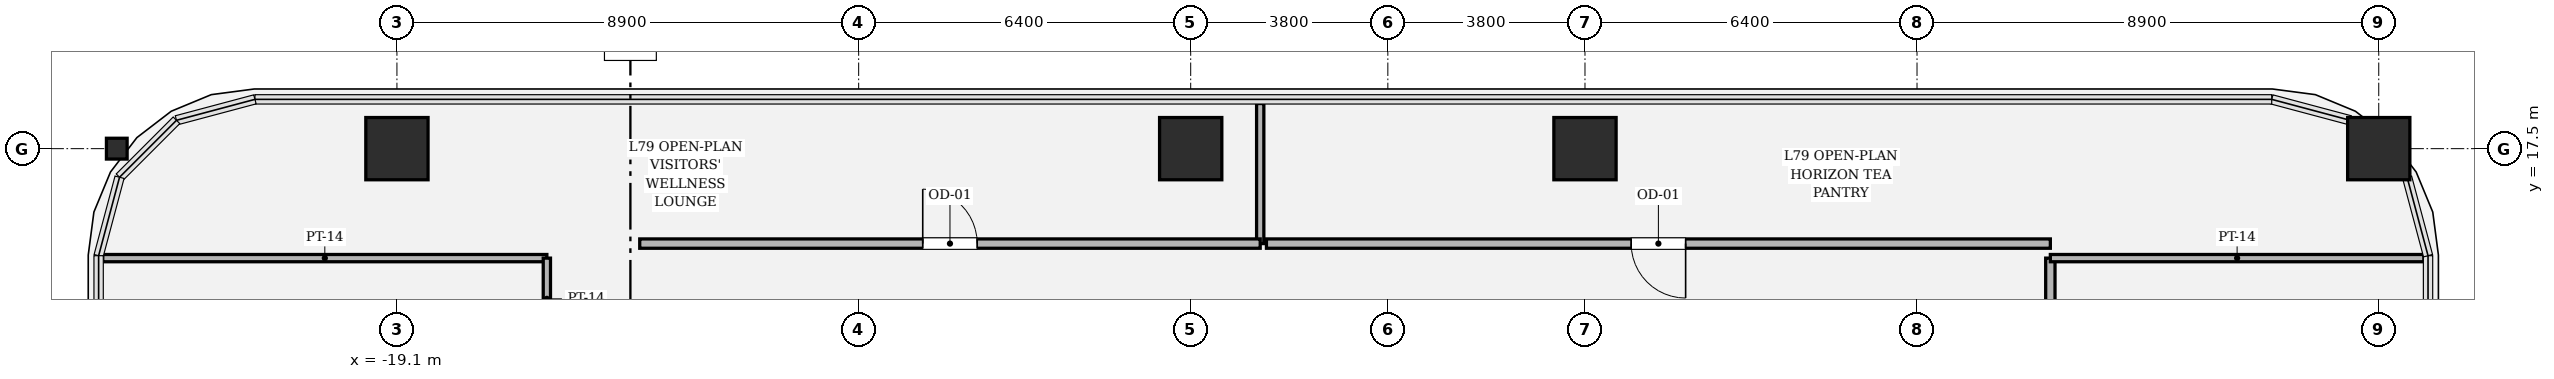
"""IFC4 building model, lengths in metres.
Left out: names, types, materials, properties, quantities, classifications, styles, units other than length and angle.
Written with IfcOpenShell. Run it as: python <this file> out.ifc"""

import sys

from ifc_helpers import new_model, si_unit, direction, frame, frame_2d, origin, origin_2d, place, context, subcontext, project, spatial, rectangle, hollow_rectangle, i_section, extrude, element, fill, save


model = new_model("IFC4")
c1 = context("Model", 3, precision=1e-05, world=origin(), true_north=direction((0.0, 1.0)))
c2 = subcontext(c1, "Body", "Model", "MODEL_VIEW")
j1 = project(units=[si_unit("LENGTHUNIT", "METRE"), si_unit("PLANEANGLEUNIT", "RADIAN")], contexts=[c1])
p1 = place(None, origin())
s1 = spatial("IfcSite", under=j1, at=p1, CompositionType="ELEMENT")
p2 = place(p1, origin())
s2 = spatial("IfcBuilding", under=s1, at=p2, CompositionType="ELEMENT")
p3 = place(p2, frame((0.0, 0.0, 334.2)))
s3 = spatial("IfcBuildingStorey", under=s2, at=p3, CompositionType="ELEMENT", Elevation=334.2)
for number, where, z_axis, x_axis in (
    (1, (19.1, 17.5, 0.0), (0.0, 0.0, 1.0), (1.0, 0.0, 0.0)),
    (2, (3.8, 17.5, 0.0), (0.0, 0.0, 1.0), (1.0, 0.0, 0.0)),
    (3, (-3.8, 17.5, 0.0), (0.0, 0.0, 1.0), (1.0, 0.0, 0.0)),
    (4, (-19.1, 17.5, 0.0), (0.0, 0.0, 1.0), (1.0, 0.0, 0.0)),
):
    element("IfcColumn", number, at=place(p3, frame(where, z_axis=z_axis, x_axis=x_axis)), inside=s3, PredefinedType="COLUMN", context=c2, shape_type="SweptSolid", body=[
        extrude(hollow_rectangle(XDim=1.2, YDim=1.2, WallThickness=0.035, at=origin_2d()), origin(), (0.0, 0.0, 1.0), 4.8),
    ])
p4 = place(p3, frame((-24.5, 17.5, 0.0), z_axis=(0.0, 0.0, 1.0), x_axis=(0.0, 1.0, 0.0)))
e5 = element("IfcColumn", 5, at=p4, inside=s3, PredefinedType="COLUMN", context=c2, shape_type="SweptSolid", body=[
    extrude(i_section(OverallWidth=0.401, OverallDepth=0.399, WebThickness=0.025, FlangeThickness=0.04, FilletRadius=0.018, at=origin_2d()), origin(), (0.0, 0.0, 1.0), 4.798),
])
p5 = place(p3, frame((-24.77, 15.39, 0.0), z_axis=(0.0, 0.0, 1.0), x_axis=(1.0, 0.0, 0.0)))
e6 = element("IfcWall", 6, at=p5, inside=s3, PredefinedType="PARTITIONING", context=c2, shape_type="SweptSolid", body=[
    extrude(rectangle(XDim=8.56, YDim=0.14, at=frame_2d((4.28, 0.0))), origin(), (0.0, 0.0, 1.0), 3.214),
])
p6 = place(p3, frame((-16.21, 15.39, 0.0), z_axis=(0.0, 0.0, 1.0), x_axis=(0.0, -1.0, 0.0)))
e7 = element("IfcWall", 7, at=p6, inside=s3, PredefinedType="PARTITIONING", context=c2, shape_type="SweptSolid", body=[
    extrude(rectangle(XDim=1.57, YDim=0.14, at=frame_2d((0.785, 0.0))), origin(), (0.0, 0.0, 1.0), 4.54),
])
p7 = place(p3, frame((12.77, 13.38, 0.0), z_axis=(0.0, 0.0, 1.0), x_axis=(0.0, 1.0, 0.0)))
e8 = element("IfcWall", 8, at=p7, inside=s3, PredefinedType="PARTITIONING", context=c2, shape_type="SweptSolid", body=[
    extrude(rectangle(XDim=2.01, YDim=0.18, at=frame_2d((1.005, 0.0))), origin(), (0.0, 0.0, 1.0), 4.174),
])
p8 = place(p3, frame((12.77, 15.39, 0.0), z_axis=(0.0, 0.0, 1.0), x_axis=(1.0, 0.0, 0.0)))
e9 = element("IfcWall", 9, at=p8, inside=s3, PredefinedType="PARTITIONING", context=c2, shape_type="SweptSolid", body=[
    extrude(rectangle(XDim=7.2, YDim=0.14, at=frame_2d((3.6, 0.0))), origin(), (0.0, 0.0, 1.0), 3.214),
])
p9 = place(p3, frame((-2.46, 18.37, 0.0), z_axis=(0.0, 0.0, 1.0), x_axis=(0.0, -1.0, 0.0)))
e10 = element("IfcWall", 10, at=p9, inside=s3, PredefinedType="PARTITIONING", context=c2, shape_type="SweptSolid", body=[
    extrude(rectangle(XDim=2.7, YDim=0.14, at=frame_2d((1.35, 0.0))), origin(), (0.0, 0.0, 1.0), 3.214),
])
p10 = place(p3, frame((-2.46, 15.67, 0.0), z_axis=(0.0, 0.0, 1.0), x_axis=(-1.0, 0.0, 0.0)))
e11 = element("IfcWall", 11, at=p10, inside=s3, PredefinedType="PARTITIONING", context=c2, shape_type="SweptSolid", body=[
    extrude(rectangle(XDim=11.96, YDim=0.18, at=frame_2d((5.98, 0.0))), origin(), (0.0, 0.0, 1.0), 3.214),
])
p11 = place(p10, frame((5.455, 0.0, 0.0)))
e12 = element("IfcOpeningElement", 12, at=p11, cuts=e11, PredefinedType="OPENING", context=c2, shape_type="SweptSolid", body=[
    extrude(rectangle(XDim=1.05, YDim=2.2, at=frame_2d((0.525, 1.1))), frame((0.0, 0.1, 0.0), z_axis=(0.0, -1.0, 0.0), x_axis=(1.0, 0.0, 0.0)), (0.0, 0.0, 1.0), 0.2),
])
p12 = place(p3, frame((12.77, 15.67, 0.0), z_axis=(0.0, 0.0, 1.0), x_axis=(-1.0, 0.0, 0.0)))
e13 = element("IfcWall", 13, at=p12, inside=s3, PredefinedType="PARTITIONING", context=c2, shape_type="SweptSolid", body=[
    extrude(rectangle(XDim=15.11, YDim=0.18, at=frame_2d((7.555, 0.0))), origin(), (0.0, 0.0, 1.0), 3.214),
])
p13 = place(p12, frame((7.03, 0.0, 0.0)))
e14 = element("IfcOpeningElement", 14, at=p13, cuts=e13, PredefinedType="OPENING", context=c2, shape_type="SweptSolid", body=[
    extrude(rectangle(XDim=1.05, YDim=2.2, at=frame_2d((0.525, 1.1))), frame((0.0, 0.1, 0.0), z_axis=(0.0, -1.0, 0.0), x_axis=(1.0, 0.0, 0.0)), (0.0, 0.0, 1.0), 0.2),
])
p14 = place(p11, origin())
e15 = element("IfcDoor", 15, at=p14, inside=s3, OperationType="SINGLE_SWING_RIGHT", PredefinedType="DOOR", context=c2, shape_type="SweptSolid", body=[
    extrude(rectangle(XDim=1.05, YDim=2.2, at=frame_2d((0.525, 1.1))), frame((0.0, 0.025, 0.0), z_axis=(0.0, -1.0, 0.0), x_axis=(1.0, 0.0, 0.0)), (0.0, 0.0, 1.0), 0.05),
])
fill(e12, e15)
p15 = place(p13, origin())
e16 = element("IfcDoor", 16, at=p15, inside=s3, OperationType="SINGLE_SWING_LEFT", PredefinedType="DOOR", context=c2, shape_type="SweptSolid", body=[
    extrude(rectangle(XDim=1.05, YDim=2.2, at=frame_2d((0.525, 1.1))), frame((0.0, 0.025, 0.0), z_axis=(0.0, -1.0, 0.0), x_axis=(1.0, 0.0, 0.0)), (0.0, 0.0, 1.0), 0.05),
])
fill(e14, e16)
save(model, sys.argv[1])
